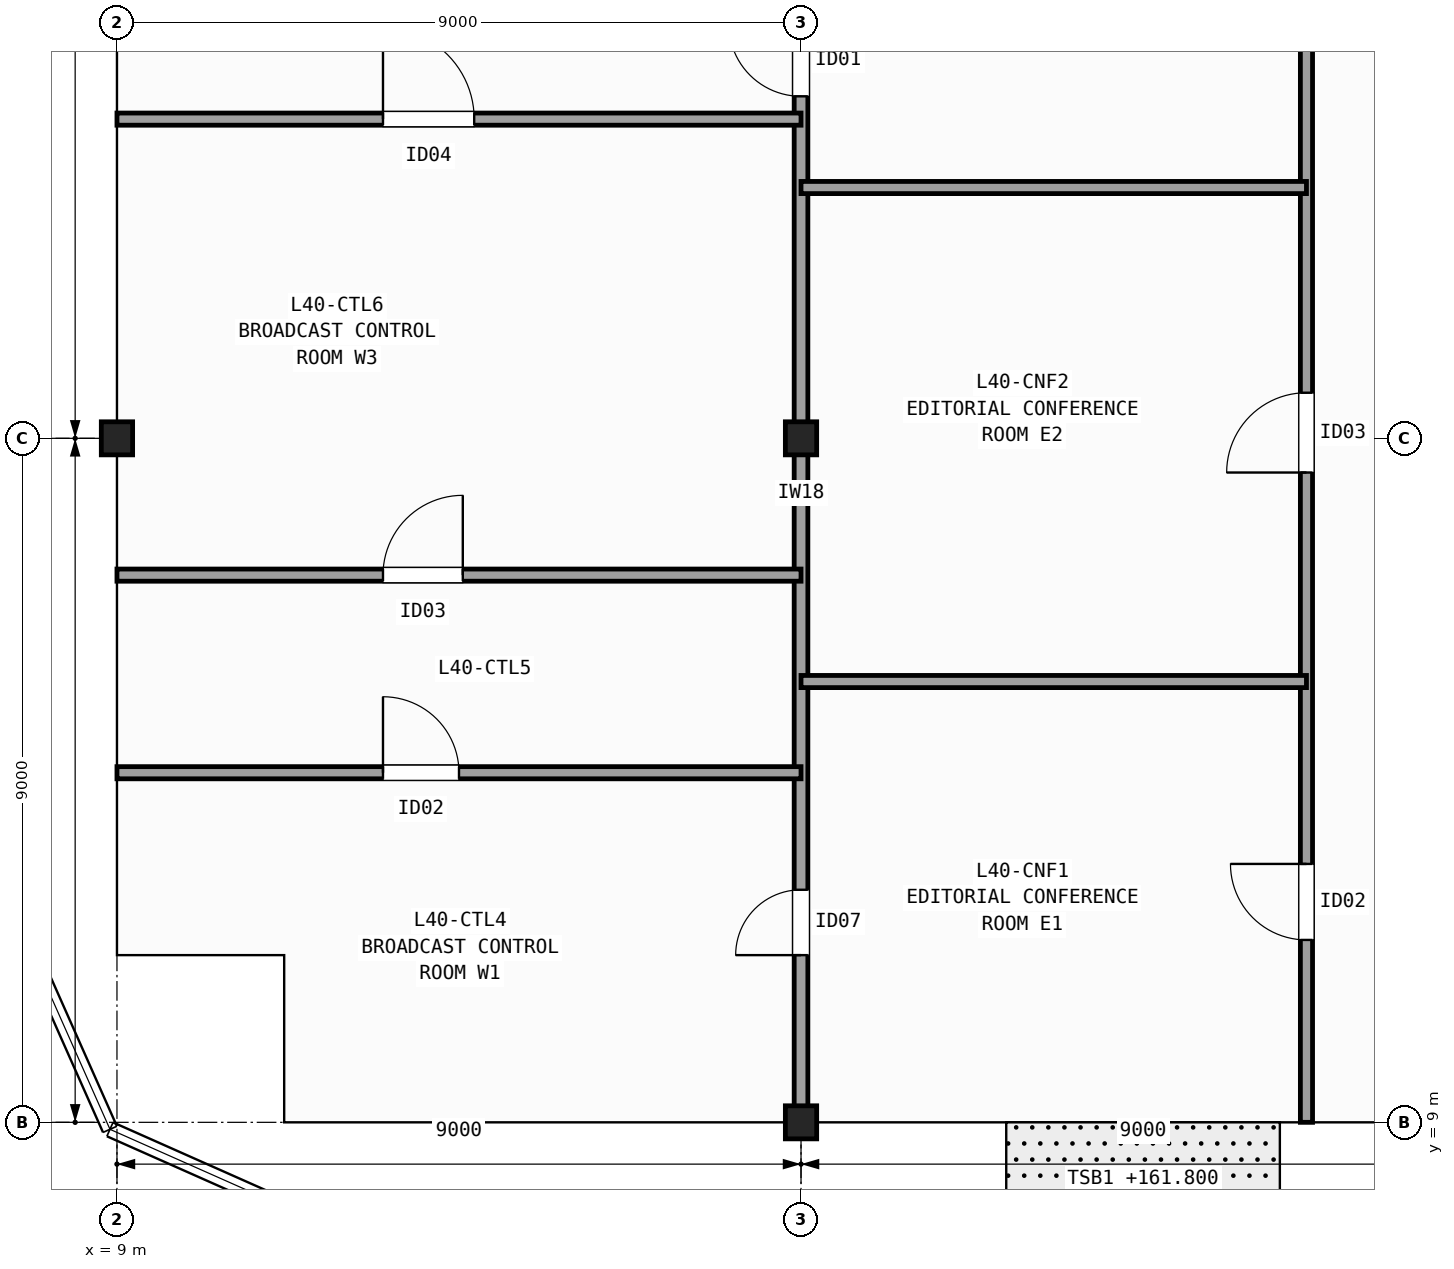
"""IFC4 building model, lengths in metres.
Left out: names, types, materials, properties, quantities, classifications, styles, units other than length and angle.
Written with IfcOpenShell. Run it as: python <this file> out.ifc"""

import sys

from ifc_helpers import new_model, si_unit, direction, frame, frame_2d, origin, origin_2d, place, context, subcontext, project, spatial, rectangle, i_section, extrude, element, fill, save


model = new_model("IFC4")
c1 = context("Model", 3, precision=1e-05, world=origin(), true_north=direction((0.0, 1.0)))
c2 = subcontext(c1, "Body", "Model", "MODEL_VIEW")
j1 = project(units=[si_unit("LENGTHUNIT", "METRE"), si_unit("PLANEANGLEUNIT", "RADIAN")], contexts=[c1])
p1 = place(None, origin())
s1 = spatial("IfcSite", under=j1, at=p1, CompositionType="ELEMENT")
p2 = place(p1, origin())
s2 = spatial("IfcBuilding", under=s1, at=p2, CompositionType="ELEMENT")
p3 = place(p2, frame((0.0, 0.0, 161.8)))
s3 = spatial("IfcBuildingStorey", under=s2, at=p3, CompositionType="ELEMENT", Elevation=161.8)
for number, where, z_axis, x_axis in (
    (1, (9.0, 18.0, 0.0), (0.0, 0.0, 1.0), (1.0, 0.0, 0.0)),
    (2, (18.0, 9.0, 0.0), (0.0, 0.0, 1.0), (1.0, 0.0, 0.0)),
    (3, (18.0, 18.0, 0.0), (0.0, 0.0, 1.0), (1.0, 0.0, 0.0)),
):
    element("IfcColumn", number, at=place(p3, frame(where, z_axis=z_axis, x_axis=x_axis)), inside=s3, PredefinedType="COLUMN", context=c2, shape_type="SweptSolid", body=[
        extrude(i_section(OverallWidth=0.412, OverallDepth=0.435, WebThickness=0.036, FlangeThickness=0.057, FilletRadius=0.015, at=origin_2d()), origin(), (0.0, 0.0, 1.0), 3.7),
    ])
p4 = place(p3, frame((24.65, 9.0, 0.0), z_axis=(0.0, 0.0, 1.0), x_axis=(0.0, 1.0, 0.0)))
e4 = element("IfcWall", 4, at=p4, inside=s3, PredefinedType="PARTITIONING", context=c2, shape_type="SweptSolid", body=[
    extrude(rectangle(XDim=19.2, YDim=0.16, at=frame_2d((9.6, 0.0))), origin(), (0.0, 0.0, 1.0), 2.634),
])
p5 = place(p4, frame((2.4, 0.0, 0.0)))
e5 = element("IfcOpeningElement", 5, at=p5, cuts=e4, PredefinedType="OPENING", context=c2, shape_type="SweptSolid", body=[
    extrude(rectangle(XDim=1.0, YDim=2.1, at=frame_2d((0.5, 1.05))), frame((0.0, 0.09, 0.0), z_axis=(0.0, -1.0, 0.0), x_axis=(1.0, 0.0, 0.0)), (0.0, 0.0, 1.0), 0.18),
])
p6 = place(p4, frame((8.55, 0.0, 0.0)))
e6 = element("IfcOpeningElement", 6, at=p6, cuts=e4, PredefinedType="OPENING", context=c2, shape_type="SweptSolid", body=[
    extrude(rectangle(XDim=1.05, YDim=2.15, at=frame_2d((0.525, 1.075))), frame((0.0, 0.09, 0.0), z_axis=(0.0, -1.0, 0.0), x_axis=(1.0, 0.0, 0.0)), (0.0, 0.0, 1.0), 0.18),
])
p7 = place(p4, frame((15.215, 0.0, 0.0)))
e7 = element("IfcOpeningElement", 7, at=p7, cuts=e4, PredefinedType="OPENING", context=c2, shape_type="SweptSolid", body=[
    extrude(rectangle(XDim=1.2, YDim=2.15, at=frame_2d((0.6, 1.075))), frame((0.0, 0.09, 0.0), z_axis=(0.0, -1.0, 0.0), x_axis=(1.0, 0.0, 0.0)), (0.0, 0.0, 1.0), 0.18),
])
p8 = place(p3, frame((18.0, 9.0, 0.0), z_axis=(0.0, 0.0, 1.0), x_axis=(0.0, 1.0, 0.0)))
e8 = element("IfcWall", 8, at=p8, inside=s3, PredefinedType="PARTITIONING", context=c2, shape_type="SweptSolid", body=[
    extrude(rectangle(XDim=19.13, YDim=0.18, at=frame_2d((9.565, 0.0))), origin(), (0.0, 0.0, 1.0), 2.634),
])
p9 = place(p8, frame((2.2, 0.0, 0.0)))
e9 = element("IfcOpeningElement", 9, at=p9, cuts=e8, PredefinedType="OPENING", context=c2, shape_type="SweptSolid", body=[
    extrude(rectangle(XDim=0.86, YDim=2.05, at=frame_2d((0.43, 1.025))), frame((0.0, 0.1, 0.0), z_axis=(0.0, -1.0, 0.0), x_axis=(1.0, 0.0, 0.0)), (0.0, 0.0, 1.0), 0.2),
])
p10 = place(p8, frame((13.5, 0.0, 0.0)))
e10 = element("IfcOpeningElement", 10, at=p10, cuts=e8, PredefinedType="OPENING", context=c2, shape_type="SweptSolid", body=[
    extrude(rectangle(XDim=0.95, YDim=2.1, at=frame_2d((0.475, 1.05))), frame((0.0, 0.1, 0.0), z_axis=(0.0, -1.0, 0.0), x_axis=(1.0, 0.0, 0.0)), (0.0, 0.0, 1.0), 0.2),
])
for number, where, z_axis, x_axis in (
    (11, (18.0, 14.8, 0.0), (0.0, 0.0, 1.0), (1.0, 0.0, 0.0)),
    (12, (18.0, 21.3, 0.0), (0.0, 0.0, 1.0), (1.0, 0.0, 0.0)),
):
    element("IfcWall", number, at=place(p3, frame(where, z_axis=z_axis, x_axis=x_axis)), inside=s3, PredefinedType="PARTITIONING", context=c2, shape_type="SweptSolid", body=[
        extrude(rectangle(XDim=6.65, YDim=0.16, at=frame_2d((3.325, 0.0))), origin(), (0.0, 0.0, 1.0), 2.792),
    ])
p11 = place(p3, frame((9.0, 13.6, 0.0), z_axis=(0.0, 0.0, 1.0), x_axis=(1.0, 0.0, 0.0)))
e13 = element("IfcWall", 13, at=p11, inside=s3, PredefinedType="PARTITIONING", context=c2, shape_type="SweptSolid", body=[
    extrude(rectangle(XDim=9.0, YDim=0.16, at=frame_2d((4.5, 0.0))), origin(), (0.0, 0.0, 1.0), 2.792),
])
p12 = place(p11, frame((3.5, 0.0, 0.0)))
e14 = element("IfcOpeningElement", 14, at=p12, cuts=e13, PredefinedType="OPENING", context=c2, shape_type="SweptSolid", body=[
    extrude(rectangle(XDim=1.0, YDim=2.1, at=frame_2d((0.5, 1.05))), frame((0.0, 0.09, 0.0), z_axis=(0.0, -1.0, 0.0), x_axis=(1.0, 0.0, 0.0)), (0.0, 0.0, 1.0), 0.18),
])
p13 = place(p3, frame((9.0, 16.2, 0.0), z_axis=(0.0, 0.0, 1.0), x_axis=(1.0, 0.0, 0.0)))
e15 = element("IfcWall", 15, at=p13, inside=s3, PredefinedType="PARTITIONING", context=c2, shape_type="SweptSolid", body=[
    extrude(rectangle(XDim=9.0, YDim=0.16, at=frame_2d((4.5, 0.0))), origin(), (0.0, 0.0, 1.0), 2.792),
])
p14 = place(p13, frame((3.5, 0.0, 0.0)))
e16 = element("IfcOpeningElement", 16, at=p14, cuts=e15, PredefinedType="OPENING", context=c2, shape_type="SweptSolid", body=[
    extrude(rectangle(XDim=1.05, YDim=2.15, at=frame_2d((0.525, 1.075))), frame((0.0, 0.09, 0.0), z_axis=(0.0, -1.0, 0.0), x_axis=(1.0, 0.0, 0.0)), (0.0, 0.0, 1.0), 0.18),
])
p15 = place(p3, frame((9.0, 22.2, 0.0), z_axis=(0.0, 0.0, 1.0), x_axis=(1.0, 0.0, 0.0)))
e17 = element("IfcWall", 17, at=p15, inside=s3, PredefinedType="PARTITIONING", context=c2, shape_type="SweptSolid", body=[
    extrude(rectangle(XDim=9.0, YDim=0.16, at=frame_2d((4.5, 0.0))), origin(), (0.0, 0.0, 1.0), 2.634),
])
p16 = place(p15, frame((3.5, 0.0, 0.0)))
e18 = element("IfcOpeningElement", 18, at=p16, cuts=e17, PredefinedType="OPENING", context=c2, shape_type="SweptSolid", body=[
    extrude(rectangle(XDim=1.2, YDim=2.15, at=frame_2d((0.6, 1.075))), frame((0.0, 0.09, 0.0), z_axis=(0.0, -1.0, 0.0), x_axis=(1.0, 0.0, 0.0)), (0.0, 0.0, 1.0), 0.18),
])
p17 = place(p5, origin())
e19 = element("IfcDoor", 19, at=p17, inside=s3, OperationType="SINGLE_SWING_RIGHT", PredefinedType="DOOR", context=c2, shape_type="SweptSolid", body=[
    extrude(rectangle(XDim=1.0, YDim=2.1, at=frame_2d((0.5, 1.05))), frame((0.0, 0.025, 0.0), z_axis=(0.0, -1.0, 0.0), x_axis=(1.0, 0.0, 0.0)), (0.0, 0.0, 1.0), 0.05),
])
fill(e5, e19)
p18 = place(p6, origin())
e20 = element("IfcDoor", 20, at=p18, inside=s3, OperationType="SINGLE_SWING_LEFT", PredefinedType="DOOR", context=c2, shape_type="SweptSolid", body=[
    extrude(rectangle(XDim=1.05, YDim=2.15, at=frame_2d((0.525, 1.075))), frame((0.0, 0.025, 0.0), z_axis=(0.0, -1.0, 0.0), x_axis=(1.0, 0.0, 0.0)), (0.0, 0.0, 1.0), 0.05),
])
fill(e6, e20)
p19 = place(p9, origin())
e21 = element("IfcDoor", 21, at=p19, inside=s3, OperationType="SINGLE_SWING_LEFT", PredefinedType="DOOR", context=c2, shape_type="SweptSolid", body=[
    extrude(rectangle(XDim=0.86, YDim=2.05, at=frame_2d((0.43, 1.025))), frame((0.0, 0.025, 0.0), z_axis=(0.0, -1.0, 0.0), x_axis=(1.0, 0.0, 0.0)), (0.0, 0.0, 1.0), 0.05),
])
fill(e9, e21)
p20 = place(p10, origin())
e22 = element("IfcDoor", 22, at=p20, inside=s3, OperationType="SINGLE_SWING_RIGHT", PredefinedType="DOOR", context=c2, shape_type="SweptSolid", body=[
    extrude(rectangle(XDim=0.95, YDim=2.1, at=frame_2d((0.475, 1.05))), frame((0.0, 0.025, 0.0), z_axis=(0.0, -1.0, 0.0), x_axis=(1.0, 0.0, 0.0)), (0.0, 0.0, 1.0), 0.05),
])
fill(e10, e22)
p21 = place(p12, origin())
e23 = element("IfcDoor", 23, at=p21, inside=s3, OperationType="SINGLE_SWING_LEFT", PredefinedType="DOOR", context=c2, shape_type="SweptSolid", body=[
    extrude(rectangle(XDim=1.0, YDim=2.1, at=frame_2d((0.5, 1.05))), frame((0.0, 0.025, 0.0), z_axis=(0.0, -1.0, 0.0), x_axis=(1.0, 0.0, 0.0)), (0.0, 0.0, 1.0), 0.05),
])
fill(e14, e23)
p22 = place(p14, origin())
e24 = element("IfcDoor", 24, at=p22, inside=s3, OperationType="SINGLE_SWING_RIGHT", PredefinedType="DOOR", context=c2, shape_type="SweptSolid", body=[
    extrude(rectangle(XDim=1.05, YDim=2.15, at=frame_2d((0.525, 1.075))), frame((0.0, 0.025, 0.0), z_axis=(0.0, -1.0, 0.0), x_axis=(1.0, 0.0, 0.0)), (0.0, 0.0, 1.0), 0.05),
])
fill(e16, e24)
p23 = place(p16, origin())
e25 = element("IfcDoor", 25, at=p23, inside=s3, OperationType="SINGLE_SWING_LEFT", PredefinedType="DOOR", context=c2, shape_type="SweptSolid", body=[
    extrude(rectangle(XDim=1.2, YDim=2.15, at=frame_2d((0.6, 1.075))), frame((0.0, 0.025, 0.0), z_axis=(0.0, -1.0, 0.0), x_axis=(1.0, 0.0, 0.0)), (0.0, 0.0, 1.0), 0.05),
])
fill(e18, e25)
save(model, sys.argv[1])
